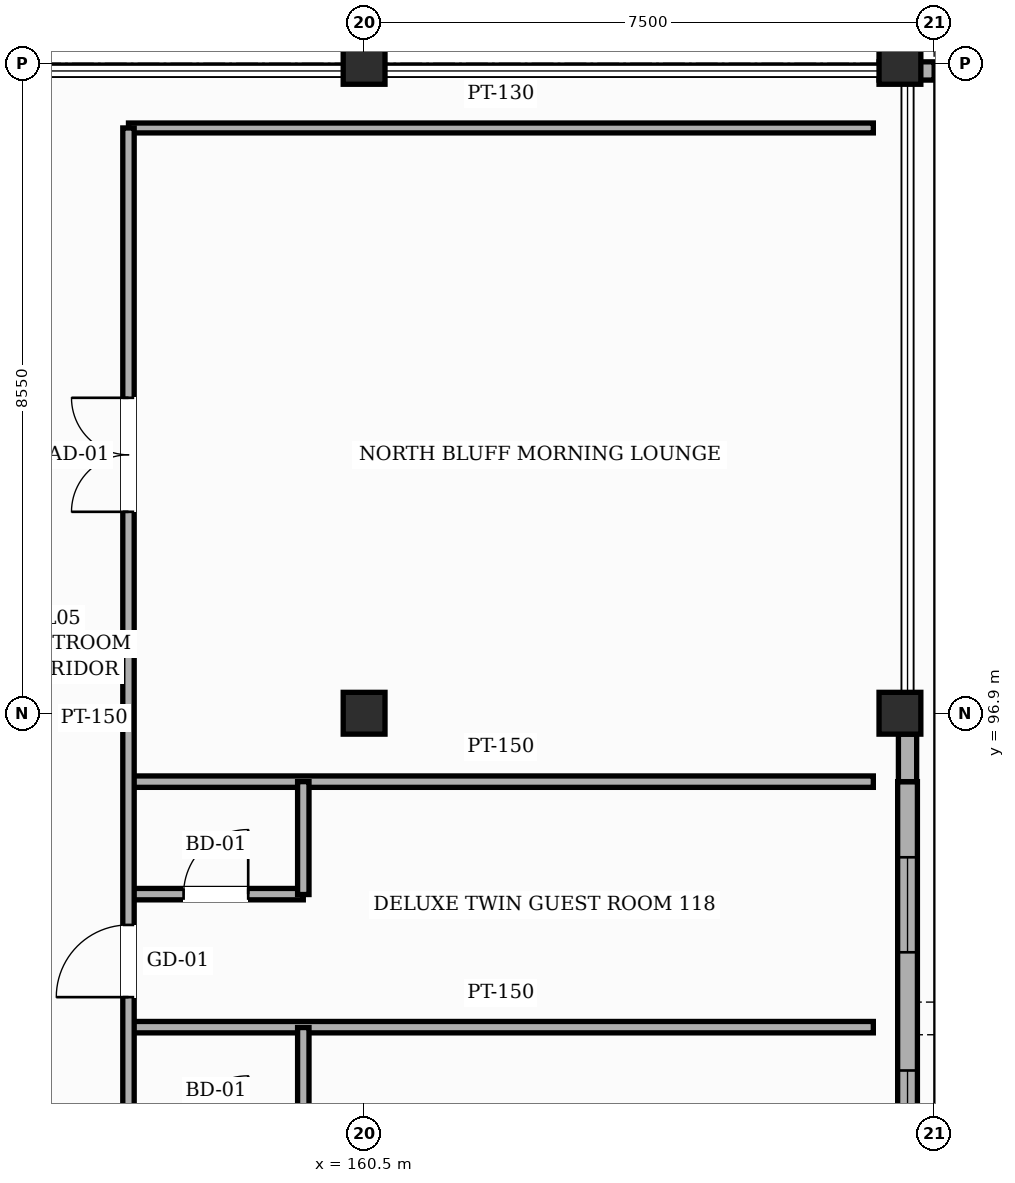
"""IFC4 building model, lengths in metres.
Left out: names, types, materials, properties, quantities, classifications, styles, units other than length and angle.
Written with IfcOpenShell. Run it as: python <this file> out.ifc"""

import sys

from ifc_helpers import new_model, si_unit, direction, frame, frame_2d, origin, origin_2d, place, context, subcontext, project, spatial, rectangle, hollow_rectangle, extrude, element, fill, save


model = new_model("IFC4")
c1 = context("Model", 3, precision=1e-05, world=origin(), true_north=direction((0.0, 1.0)))
c2 = subcontext(c1, "Body", "Model", "MODEL_VIEW")
j1 = project(units=[si_unit("LENGTHUNIT", "METRE"), si_unit("PLANEANGLEUNIT", "RADIAN")], contexts=[c1])
p1 = place(None, origin())
s1 = spatial("IfcSite", under=j1, at=p1, CompositionType="ELEMENT")
p2 = place(p1, origin())
s2 = spatial("IfcBuilding", under=s1, at=p2, CompositionType="ELEMENT")
p3 = place(p2, frame((0.0, 0.0, 24.6)))
s3 = spatial("IfcBuildingStorey", under=s2, at=p3, CompositionType="ELEMENT", Elevation=24.6)
for number, where, z_axis, x_axis in (
    (1, (160.5, 96.9, 0.0), (0.0, 0.0, 1.0), (1.0, 0.0, 0.0)),
    (2, (160.5, 105.45, 0.0), (0.0, 0.0, 1.0), (1.0, 0.0, 0.0)),
    (3, (167.55, 96.9, 0.0), (0.0, 0.0, 1.0), (1.0, 0.0, 0.0)),
    (4, (167.55, 105.45, 0.0), (0.0, 0.0, 1.0), (1.0, 0.0, 0.0)),
):
    element("IfcColumn", number, at=place(p3, frame(where, z_axis=z_axis, x_axis=x_axis)), inside=s3, PredefinedType="COLUMN", context=c2, shape_type="SweptSolid", body=[
        extrude(hollow_rectangle(XDim=0.55, YDim=0.55, WallThickness=0.022, InnerFilletRadius=0.022, OuterFilletRadius=0.044, at=origin_2d()), origin(), (0.0, 0.0, 1.0), 3.6),
    ])
p4 = place(p3, frame((167.65, 96.0, 0.0), z_axis=(0.0, 0.0, 1.0), x_axis=(0.0, -1.0, 0.0)))
e5 = element("IfcWall", 5, at=p4, inside=s3, PredefinedType="SOLIDWALL", context=c2, shape_type="SweptSolid", body=[
    extrude(rectangle(XDim=6.825, YDim=0.26, at=frame_2d((3.413, 0.0))), origin(), (0.0, 0.0, 1.0), 2.755),
])
p5 = place(p4, frame((3.8, 0.0, 0.85)))
e6 = element("IfcOpeningElement", 6, at=p5, cuts=e5, PredefinedType="OPENING", context=c2, shape_type="SweptSolid", body=[
    extrude(rectangle(XDim=2.1, YDim=1.65, at=frame_2d((1.05, 0.825))), frame((0.0, 0.14, 0.0), z_axis=(0.0, -1.0, 0.0), x_axis=(1.0, 0.0, 0.0)), (0.0, 0.0, 1.0), 0.28),
])
p6 = place(p4, frame((0.995, 0.0, 0.85)))
e7 = element("IfcOpeningElement", 7, at=p6, cuts=e5, PredefinedType="OPENING", context=c2, shape_type="SweptSolid", body=[
    extrude(rectangle(XDim=1.25, YDim=1.35, at=frame_2d((0.625, 0.675))), frame((0.0, 0.14, 0.0), z_axis=(0.0, -1.0, 0.0), x_axis=(1.0, 0.0, 0.0)), (0.0, 0.0, 1.0), 0.28),
])
p7 = place(p3, frame((167.65, 96.625, 0.0), z_axis=(0.0, 0.0, 1.0), x_axis=(0.0, -1.0, 0.0)))
e8 = element("IfcWall", 8, at=p7, inside=s3, PredefinedType="SOLIDWALL", context=c2, shape_type="SweptSolid", body=[
    extrude(rectangle(XDim=0.625, YDim=0.24, at=frame_2d((0.312, 0.0))), origin(), (0.0, 0.0, 1.0), 2.755),
])
p8 = place(p3, frame((167.275, 105.35, 0.0), z_axis=(0.0, 0.0, 1.0), x_axis=(1.0, 0.0, 0.0)))
e9 = element("IfcWall", 9, at=p8, inside=s3, PredefinedType="SOLIDWALL", context=c2, shape_type="SweptSolid", body=[
    extrude(rectangle(XDim=0.725, YDim=0.24, at=frame_2d((0.363, 0.0))), origin(), (0.0, 0.0, 1.0), 3.365),
])
p9 = place(p3, frame((157.4, 92.77, 0.0), z_axis=(0.0, 0.0, 1.0), x_axis=(1.0, 0.0, 0.0)))
e10 = element("IfcWall", 10, at=p9, inside=s3, PredefinedType="PARTITIONING", context=c2, shape_type="SweptSolid", body=[
    extrude(rectangle(XDim=9.8, YDim=0.15, at=frame_2d((4.9, 0.0))), origin(), (0.0, 0.0, 1.0), 3.005),
])
p10 = place(p3, frame((157.4, 94.52, 0.0), z_axis=(0.0, 0.0, 1.0), x_axis=(1.0, 0.0, 0.0)))
e11 = element("IfcWall", 11, at=p10, inside=s3, PredefinedType="PARTITIONING", context=c2, shape_type="SweptSolid", body=[
    extrude(rectangle(XDim=2.3, YDim=0.15, at=frame_2d((1.15, 0.0))), origin(), (0.0, 0.0, 1.0), 3.365),
])
p11 = place(p10, frame((0.725, 0.0, 0.0)))
e12 = element("IfcOpeningElement", 12, at=p11, cuts=e11, PredefinedType="OPENING", context=c2, shape_type="SweptSolid", body=[
    extrude(rectangle(XDim=0.85, YDim=2.1, at=frame_2d((0.425, 1.05))), frame((0.0, 0.085, 0.0), z_axis=(0.0, -1.0, 0.0), x_axis=(1.0, 0.0, 0.0)), (0.0, 0.0, 1.0), 0.17),
])
p12 = place(p3, frame((157.4, 96.0, 0.0), z_axis=(0.0, 0.0, 1.0), x_axis=(1.0, 0.0, 0.0)))
e13 = element("IfcWall", 13, at=p12, inside=s3, PredefinedType="PARTITIONING", context=c2, shape_type="SweptSolid", body=[
    extrude(rectangle(XDim=9.8, YDim=0.15, at=frame_2d((4.9, 0.0))), origin(), (0.0, 0.0, 1.0), 3.365),
])
p13 = place(p3, frame((157.4, 104.6, 0.0), z_axis=(0.0, 0.0, 1.0), x_axis=(1.0, 0.0, 0.0)))
e14 = element("IfcWall", 14, at=p13, inside=s3, PredefinedType="PARTITIONING", context=c2, shape_type="SweptSolid", body=[
    extrude(rectangle(XDim=9.8, YDim=0.13, at=frame_2d((4.9, 0.0))), origin(), (0.0, 0.0, 1.0), 3.365),
])
p14 = place(p3, frame((157.4, 76.6, 0.0), z_axis=(0.0, 0.0, 1.0), x_axis=(0.0, 1.0, 0.0)))
e15 = element("IfcWall", 15, at=p14, inside=s3, PredefinedType="PARTITIONING", context=c2, shape_type="SweptSolid", body=[
    extrude(rectangle(XDim=28.0, YDim=0.15, at=frame_2d((14.0, 0.0))), origin(), (0.0, 0.0, 1.0), 3.365),
])
p15 = place(p14, frame((22.95, 0.0, 0.0)))
e16 = element("IfcOpeningElement", 16, at=p15, cuts=e15, PredefinedType="OPENING", context=c2, shape_type="SweptSolid", body=[
    extrude(rectangle(XDim=1.5, YDim=2.3, at=frame_2d((0.75, 1.15))), frame((0.0, 0.085, 0.0), z_axis=(0.0, -1.0, 0.0), x_axis=(1.0, 0.0, 0.0)), (0.0, 0.0, 1.0), 0.17),
])
p16 = place(p14, frame((0.4, 0.0, 0.0)))
e17 = element("IfcOpeningElement", 17, at=p16, cuts=e15, PredefinedType="OPENING", context=c2, shape_type="SweptSolid", body=[
    extrude(rectangle(XDim=0.95, YDim=2.15, at=frame_2d((0.475, 1.075))), frame((0.0, 0.085, 0.0), z_axis=(0.0, -1.0, 0.0), x_axis=(1.0, 0.0, 0.0)), (0.0, 0.0, 1.0), 0.17),
])
p17 = place(p14, frame((3.635, 0.0, 0.0)))
e18 = element("IfcOpeningElement", 18, at=p17, cuts=e15, PredefinedType="OPENING", context=c2, shape_type="SweptSolid", body=[
    extrude(rectangle(XDim=0.95, YDim=2.15, at=frame_2d((0.475, 1.075))), frame((0.0, 0.085, 0.0), z_axis=(0.0, -1.0, 0.0), x_axis=(1.0, 0.0, 0.0)), (0.0, 0.0, 1.0), 0.17),
])
p18 = place(p14, frame((6.865, 0.0, 0.0)))
e19 = element("IfcOpeningElement", 19, at=p18, cuts=e15, PredefinedType="OPENING", context=c2, shape_type="SweptSolid", body=[
    extrude(rectangle(XDim=0.95, YDim=2.15, at=frame_2d((0.475, 1.075))), frame((0.0, 0.085, 0.0), z_axis=(0.0, -1.0, 0.0), x_axis=(1.0, 0.0, 0.0)), (0.0, 0.0, 1.0), 0.17),
])
p19 = place(p14, frame((10.1, 0.0, 0.0)))
e20 = element("IfcOpeningElement", 20, at=p19, cuts=e15, PredefinedType="OPENING", context=c2, shape_type="SweptSolid", body=[
    extrude(rectangle(XDim=0.95, YDim=2.15, at=frame_2d((0.475, 1.075))), frame((0.0, 0.085, 0.0), z_axis=(0.0, -1.0, 0.0), x_axis=(1.0, 0.0, 0.0)), (0.0, 0.0, 1.0), 0.17),
])
p20 = place(p14, frame((13.335, 0.0, 0.0)))
e21 = element("IfcOpeningElement", 21, at=p20, cuts=e15, PredefinedType="OPENING", context=c2, shape_type="SweptSolid", body=[
    extrude(rectangle(XDim=0.95, YDim=2.15, at=frame_2d((0.475, 1.075))), frame((0.0, 0.085, 0.0), z_axis=(0.0, -1.0, 0.0), x_axis=(1.0, 0.0, 0.0)), (0.0, 0.0, 1.0), 0.17),
])
p21 = place(p14, frame((16.565, 0.0, 0.0)))
e22 = element("IfcOpeningElement", 22, at=p21, cuts=e15, PredefinedType="OPENING", context=c2, shape_type="SweptSolid", body=[
    extrude(rectangle(XDim=0.95, YDim=2.15, at=frame_2d((0.475, 1.075))), frame((0.0, 0.085, 0.0), z_axis=(0.0, -1.0, 0.0), x_axis=(1.0, 0.0, 0.0)), (0.0, 0.0, 1.0), 0.17),
])
p22 = place(p3, frame((159.7, 91.285, 0.0), z_axis=(0.0, 0.0, 1.0), x_axis=(0.0, 1.0, 0.0)))
e23 = element("IfcWall", 23, at=p22, inside=s3, PredefinedType="PARTITIONING", context=c2, shape_type="SweptSolid", body=[
    extrude(rectangle(XDim=1.48, YDim=0.15, at=frame_2d((0.74, 0.0))), origin(), (0.0, 0.0, 1.0), 3.365),
])
p23 = place(p3, frame((159.7, 94.515, 0.0), z_axis=(0.0, 0.0, 1.0), x_axis=(0.0, 1.0, 0.0)))
e24 = element("IfcWall", 24, at=p23, inside=s3, PredefinedType="PARTITIONING", context=c2, shape_type="SweptSolid", body=[
    extrude(rectangle(XDim=1.485, YDim=0.15, at=frame_2d((0.743, 0.0))), origin(), (0.0, 0.0, 1.0), 3.365),
])
p24 = place(p5, origin())
e25 = element("IfcWindow", 25, at=p24, inside=s3, PartitioningType="SINGLE_PANEL", PredefinedType="WINDOW", context=c2, shape_type="SweptSolid", body=[
    extrude(rectangle(XDim=2.1, YDim=1.65, at=frame_2d((1.05, 0.825))), frame((0.0, 0.03, 0.0), z_axis=(0.0, -1.0, 0.0), x_axis=(1.0, 0.0, 0.0)), (0.0, 0.0, 1.0), 0.06),
])
fill(e6, e25)
p25 = place(p6, origin())
e26 = element("IfcWindow", 26, at=p25, inside=s3, PartitioningType="SINGLE_PANEL", PredefinedType="WINDOW", context=c2, shape_type="SweptSolid", body=[
    extrude(rectangle(XDim=1.25, YDim=1.35, at=frame_2d((0.625, 0.675))), frame((0.0, 0.03, 0.0), z_axis=(0.0, -1.0, 0.0), x_axis=(1.0, 0.0, 0.0)), (0.0, 0.0, 1.0), 0.06),
])
fill(e7, e26)
p26 = place(p15, origin())
e27 = element("IfcDoor", 27, at=p26, inside=s3, OperationType="DOUBLE_DOOR_SINGLE_SWING", PredefinedType="DOOR", context=c2, shape_type="SweptSolid", body=[
    extrude(rectangle(XDim=1.5, YDim=2.3, at=frame_2d((0.75, 1.15))), frame((0.0, 0.025, 0.0), z_axis=(0.0, -1.0, 0.0), x_axis=(1.0, 0.0, 0.0)), (0.0, 0.0, 1.0), 0.05),
])
fill(e16, e27)
p27 = place(p21, origin())
e28 = element("IfcDoor", 28, at=p27, inside=s3, OperationType="SINGLE_SWING_LEFT", PredefinedType="DOOR", context=c2, shape_type="SweptSolid", body=[
    extrude(rectangle(XDim=0.95, YDim=2.15, at=frame_2d((0.475, 1.075))), frame((0.0, 0.025, 0.0), z_axis=(0.0, -1.0, 0.0), x_axis=(1.0, 0.0, 0.0)), (0.0, 0.0, 1.0), 0.05),
])
fill(e22, e28)
p28 = place(p11, origin())
e29 = element("IfcDoor", 29, at=p28, inside=s3, OperationType="SINGLE_SWING_RIGHT", PredefinedType="DOOR", context=c2, shape_type="SweptSolid", body=[
    extrude(rectangle(XDim=0.85, YDim=2.1, at=frame_2d((0.425, 1.05))), frame((0.0, 0.025, 0.0), z_axis=(0.0, -1.0, 0.0), x_axis=(1.0, 0.0, 0.0)), (0.0, 0.0, 1.0), 0.05),
])
fill(e12, e29)
save(model, sys.argv[1])
